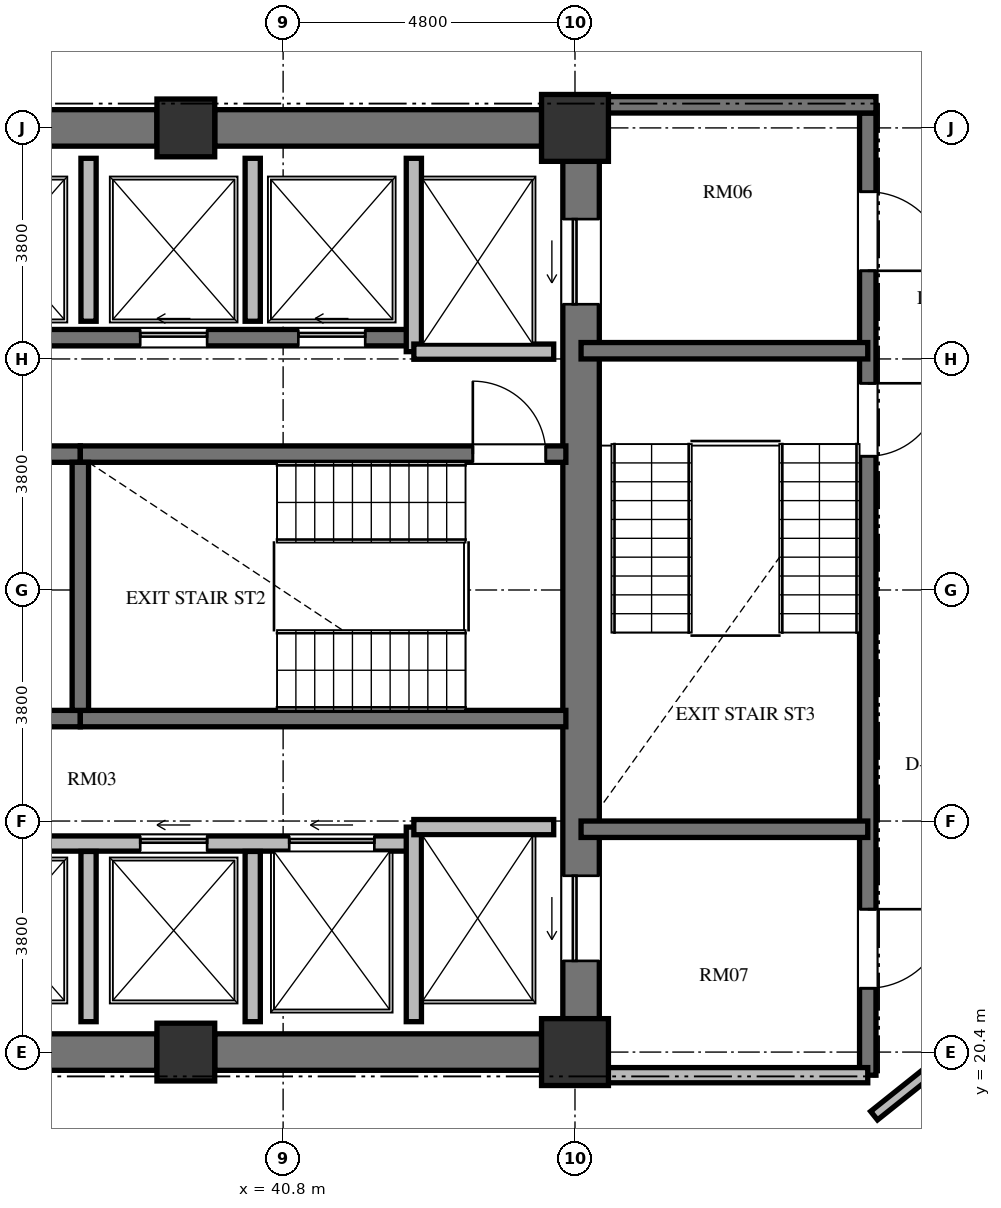
"""IFC4 building model, lengths in metres.
Left out: names, types, materials, properties, quantities, classifications, styles, units other than length and angle.
Written with IfcOpenShell. Run it as: python <this file> out.ifc"""

import sys

from ifc_helpers import new_model, si_unit, direction, frame, frame_2d, origin, origin_2d, place, context, subcontext, project, spatial, rectangle, extrude, element, fill, save


model = new_model("IFC4")
c1 = context("Model", 3, precision=1e-05, world=origin(), true_north=direction((0.0, 1.0)))
c2 = subcontext(c1, "Body", "Model", "MODEL_VIEW")
j1 = project(units=[si_unit("LENGTHUNIT", "METRE"), si_unit("PLANEANGLEUNIT", "RADIAN")], contexts=[c1])
p1 = place(None, origin())
s1 = spatial("IfcSite", under=j1, at=p1, CompositionType="ELEMENT")
p2 = place(p1, origin())
s2 = spatial("IfcBuilding", under=s1, at=p2, CompositionType="ELEMENT")
p3 = place(p2, frame((0.0, 0.0, 149.232)))
s3 = spatial("IfcBuildingStorey", under=s2, at=p3, CompositionType="ELEMENT", Elevation=149.232)
p4 = place(p3, frame((39.2, 20.4, 0.0), z_axis=(0.0, 0.0, 1.0), x_axis=(1.0, 0.0, 0.0)))
e1 = element("IfcColumn", 1, at=p4, inside=s3, PredefinedType="COLUMN", context=c2, shape_type="SweptSolid", body=[
    extrude(rectangle(XDim=0.95, YDim=0.95, at=origin_2d()), origin(), (0.0, 0.0, 1.0), 3.648),
])
for number, where, z_axis, x_axis in (
    (2, (45.6, 20.4, 0.0), (0.0, 0.0, 1.0), (1.0, 0.0, 0.0)),
    (3, (45.6, 35.6, 0.0), (0.0, 0.0, 1.0), (1.0, 0.0, 0.0)),
):
    element("IfcColumn", number, at=place(p3, frame(where, z_axis=z_axis, x_axis=x_axis)), inside=s3, PredefinedType="COLUMN", context=c2, shape_type="SweptSolid", body=[
        extrude(rectangle(XDim=1.1, YDim=1.1, at=origin_2d()), origin(), (0.0, 0.0, 1.0), 3.648),
    ])
p5 = place(p3, frame((39.2, 35.6, 0.0), z_axis=(0.0, 0.0, 1.0), x_axis=(1.0, 0.0, 0.0)))
e4 = element("IfcColumn", 4, at=p5, inside=s3, PredefinedType="COLUMN", context=c2, shape_type="SweptSolid", body=[
    extrude(rectangle(XDim=0.95, YDim=0.95, at=origin_2d()), origin(), (0.0, 0.0, 1.0), 3.648),
])
p6 = place(p3, frame((45.7, 20.95, 0.0), z_axis=(0.0, 0.0, 1.0), x_axis=(0.0, 1.0, 0.0)))
e5 = element("IfcWall", 5, at=p6, inside=s3, PredefinedType="SHEAR", context=c2, shape_type="SweptSolid", body=[
    extrude(rectangle(XDim=14.1, YDim=0.6, at=frame_2d((7.05, 0.0))), origin(), (0.0, 0.0, 1.0), 3.648),
])
p7 = place(p6, frame((11.75, 0.0, 0.0)))
e6 = element("IfcOpeningElement", 6, at=p7, cuts=e5, PredefinedType="OPENING", context=c2, shape_type="SweptSolid", body=[
    extrude(rectangle(XDim=1.4, YDim=2.3, at=frame_2d((0.7, 1.15))), frame((0.0, 0.31, 0.0), z_axis=(0.0, -1.0, 0.0), x_axis=(1.0, 0.0, 0.0)), (0.0, 0.0, 1.0), 0.62),
])
p8 = place(p6, frame((0.95, 0.0, 0.0)))
e7 = element("IfcOpeningElement", 7, at=p8, cuts=e5, PredefinedType="OPENING", context=c2, shape_type="SweptSolid", body=[
    extrude(rectangle(XDim=1.4, YDim=2.3, at=frame_2d((0.7, 1.15))), frame((0.0, 0.31, 0.0), z_axis=(0.0, -1.0, 0.0), x_axis=(1.0, 0.0, 0.0)), (0.0, 0.0, 1.0), 0.62),
])
for number, where, z_axis, x_axis in (
    (8, (33.275, 20.4, 0.0), (0.0, 0.0, 1.0), (1.0, 0.0, 0.0)),
    (9, (33.275, 35.6, 0.0), (0.0, 0.0, 1.0), (1.0, 0.0, 0.0)),
):
    element("IfcWall", number, at=place(p3, frame(where, z_axis=z_axis, x_axis=x_axis)), inside=s3, PredefinedType="SHEAR", context=c2, shape_type="SweptSolid", body=[
        extrude(rectangle(XDim=5.45, YDim=0.6, at=frame_2d((2.725, 0.0))), origin(), (0.0, 0.0, 1.0), 3.648),
    ])
for number, where, z_axis, x_axis in (
    (10, (39.675, 20.4, 0.0), (0.0, 0.0, 1.0), (1.0, 0.0, 0.0)),
    (11, (39.675, 35.6, 0.0), (0.0, 0.0, 1.0), (1.0, 0.0, 0.0)),
):
    element("IfcWall", number, at=place(p3, frame(where, z_axis=z_axis, x_axis=x_axis)), inside=s3, PredefinedType="SHEAR", context=c2, shape_type="SweptSolid", body=[
        extrude(rectangle(XDim=5.375, YDim=0.6, at=frame_2d((2.688, 0.0))), origin(), (0.0, 0.0, 1.0), 3.648),
    ])
p9 = place(p3, frame((34.535, 30.235, 0.0), z_axis=(0.0, 0.0, 1.0), x_axis=(1.0, 0.0, 0.0)))
e12 = element("IfcWall", 12, at=p9, inside=s3, PredefinedType="SHEAR", context=c2, shape_type="SweptSolid", body=[
    extrude(rectangle(XDim=2.93, YDim=0.27, at=frame_2d((1.465, 0.0))), origin(), (0.0, 0.0, 1.0), 3.648),
])
p10 = place(p9, frame((0.965, 0.0, 0.0)))
e13 = element("IfcOpeningElement", 13, at=p10, cuts=e12, PredefinedType="OPENING", context=c2, shape_type="SweptSolid", body=[
    extrude(rectangle(XDim=1.0, YDim=2.1, at=frame_2d((0.5, 1.05))), frame((0.0, 0.145, 0.0), z_axis=(0.0, -1.0, 0.0), x_axis=(1.0, 0.0, 0.0)), (0.0, 0.0, 1.0), 0.29),
])
p11 = place(p3, frame((37.465, 30.235, 0.0), z_axis=(0.0, 0.0, 1.0), x_axis=(1.0, 0.0, 0.0)))
e14 = element("IfcWall", 14, at=p11, inside=s3, PredefinedType="SHEAR", context=c2, shape_type="SweptSolid", body=[
    extrude(rectangle(XDim=7.985, YDim=0.27, at=frame_2d((3.992, 0.0))), origin(), (0.0, 0.0, 1.0), 3.648),
])
p12 = place(p11, frame((6.455, 0.0, 0.0)))
e15 = element("IfcOpeningElement", 15, at=p12, cuts=e14, PredefinedType="OPENING", context=c2, shape_type="SweptSolid", body=[
    extrude(rectangle(XDim=1.2, YDim=2.15, at=frame_2d((0.6, 1.075))), frame((0.0, 0.145, 0.0), z_axis=(0.0, -1.0, 0.0), x_axis=(1.0, 0.0, 0.0)), (0.0, 0.0, 1.0), 0.29),
])
p13 = place(p3, frame((34.535, 25.885, 0.0), z_axis=(0.0, 0.0, 1.0), x_axis=(1.0, 0.0, 0.0)))
e16 = element("IfcWall", 16, at=p13, inside=s3, PredefinedType="SHEAR", context=c2, shape_type="SweptSolid", body=[
    extrude(rectangle(XDim=2.93, YDim=0.27, at=frame_2d((1.465, 0.0))), origin(), (0.0, 0.0, 1.0), 3.648),
])
p14 = place(p3, frame((37.465, 25.885, 0.0), z_axis=(0.0, 0.0, 1.0), x_axis=(1.0, 0.0, 0.0)))
e17 = element("IfcWall", 17, at=p14, inside=s3, PredefinedType="SHEAR", context=c2, shape_type="SweptSolid", body=[
    extrude(rectangle(XDim=7.985, YDim=0.27, at=frame_2d((3.992, 0.0))), origin(), (0.0, 0.0, 1.0), 3.648),
])
p15 = place(p3, frame((37.465, 26.02, 0.0), z_axis=(0.0, 0.0, 1.0), x_axis=(0.0, 1.0, 0.0)))
e18 = element("IfcWall", 18, at=p15, inside=s3, PredefinedType="SHEAR", context=c2, shape_type="SweptSolid", body=[
    extrude(rectangle(XDim=4.08, YDim=0.27, at=frame_2d((2.04, 0.0))), origin(), (0.0, 0.0, 1.0), 3.648),
])
p16 = place(p3, frame((26.55, 32.15, 0.0), z_axis=(0.0, 0.0, 1.0), x_axis=(1.0, 0.0, 0.0)))
e19 = element("IfcWall", 19, at=p16, inside=s3, PredefinedType="SHEAR", context=c2, shape_type="SweptSolid", body=[
    extrude(rectangle(XDim=16.4, YDim=0.27, at=frame_2d((8.2, 0.0))), origin(), (0.0, 0.0, 1.0), 3.648),
])
p17 = place(p16, frame((2.425, 0.0, 0.0)))
e20 = element("IfcOpeningElement", 20, at=p17, cuts=e19, PredefinedType="OPENING", context=c2, shape_type="SweptSolid", body=[
    extrude(rectangle(XDim=1.05, YDim=2.15, at=frame_2d((0.525, 1.075))), frame((0.0, 0.145, 0.0), z_axis=(0.0, -1.0, 0.0), x_axis=(1.0, 0.0, 0.0)), (0.0, 0.0, 1.0), 0.29),
])
p18 = place(p16, frame((6.5, 0.0, 0.0)))
e21 = element("IfcOpeningElement", 21, at=p18, cuts=e19, PredefinedType="OPENING", context=c2, shape_type="SweptSolid", body=[
    extrude(rectangle(XDim=1.1, YDim=2.2, at=frame_2d((0.55, 1.1))), frame((0.0, 0.145, 0.0), z_axis=(0.0, -1.0, 0.0), x_axis=(1.0, 0.0, 0.0)), (0.0, 0.0, 1.0), 0.29),
])
p19 = place(p16, frame((9.1, 0.0, 0.0)))
e22 = element("IfcOpeningElement", 22, at=p19, cuts=e19, PredefinedType="OPENING", context=c2, shape_type="SweptSolid", body=[
    extrude(rectangle(XDim=1.1, YDim=2.2, at=frame_2d((0.55, 1.1))), frame((0.0, 0.145, 0.0), z_axis=(0.0, -1.0, 0.0), x_axis=(1.0, 0.0, 0.0)), (0.0, 0.0, 1.0), 0.29),
])
p20 = place(p16, frame((11.9, 0.0, 0.0)))
e23 = element("IfcOpeningElement", 23, at=p20, cuts=e19, PredefinedType="OPENING", context=c2, shape_type="SweptSolid", body=[
    extrude(rectangle(XDim=1.1, YDim=2.2, at=frame_2d((0.55, 1.1))), frame((0.0, 0.145, 0.0), z_axis=(0.0, -1.0, 0.0), x_axis=(1.0, 0.0, 0.0)), (0.0, 0.0, 1.0), 0.29),
])
p21 = place(p16, frame((14.5, 0.0, 0.0)))
e24 = element("IfcOpeningElement", 24, at=p21, cuts=e19, PredefinedType="OPENING", context=c2, shape_type="SweptSolid", body=[
    extrude(rectangle(XDim=1.1, YDim=2.2, at=frame_2d((0.55, 1.1))), frame((0.0, 0.145, 0.0), z_axis=(0.0, -1.0, 0.0), x_axis=(1.0, 0.0, 0.0)), (0.0, 0.0, 1.0), 0.29),
])
p22 = place(p3, frame((26.75, 23.83, 0.0), z_axis=(0.0, 0.0, 1.0), x_axis=(1.0, 0.0, 0.0)))
e25 = element("IfcWall", 25, at=p22, inside=s3, PredefinedType="SOLIDWALL", context=c2, shape_type="SweptSolid", body=[
    extrude(rectangle(XDim=16.2, YDim=0.25, at=frame_2d((8.1, 0.0))), origin(), (0.0, 0.0, 1.0), 3.428),
])
p23 = place(p22, frame((2.225, 0.0, 0.0)))
e26 = element("IfcOpeningElement", 26, at=p23, cuts=e25, PredefinedType="OPENING", context=c2, shape_type="SweptSolid", body=[
    extrude(rectangle(XDim=1.05, YDim=2.15, at=frame_2d((0.525, 1.075))), frame((0.0, 0.135, 0.0), z_axis=(0.0, -1.0, 0.0), x_axis=(1.0, 0.0, 0.0)), (0.0, 0.0, 1.0), 0.27),
])
p24 = place(p22, frame((6.3, 0.0, 0.0)))
e27 = element("IfcOpeningElement", 27, at=p24, cuts=e25, PredefinedType="OPENING", context=c2, shape_type="SweptSolid", body=[
    extrude(rectangle(XDim=1.1, YDim=2.2, at=frame_2d((0.55, 1.1))), frame((0.0, 0.135, 0.0), z_axis=(0.0, -1.0, 0.0), x_axis=(1.0, 0.0, 0.0)), (0.0, 0.0, 1.0), 0.27),
])
p25 = place(p22, frame((8.9, 0.0, 0.0)))
e28 = element("IfcOpeningElement", 28, at=p25, cuts=e25, PredefinedType="OPENING", context=c2, shape_type="SweptSolid", body=[
    extrude(rectangle(XDim=1.1, YDim=2.2, at=frame_2d((0.55, 1.1))), frame((0.0, 0.135, 0.0), z_axis=(0.0, -1.0, 0.0), x_axis=(1.0, 0.0, 0.0)), (0.0, 0.0, 1.0), 0.27),
])
p26 = place(p22, frame((11.7, 0.0, 0.0)))
e29 = element("IfcOpeningElement", 29, at=p26, cuts=e25, PredefinedType="OPENING", context=c2, shape_type="SweptSolid", body=[
    extrude(rectangle(XDim=1.1, YDim=2.2, at=frame_2d((0.55, 1.1))), frame((0.0, 0.135, 0.0), z_axis=(0.0, -1.0, 0.0), x_axis=(1.0, 0.0, 0.0)), (0.0, 0.0, 1.0), 0.27),
])
p27 = place(p22, frame((14.15, 0.0, 0.0)))
e30 = element("IfcOpeningElement", 30, at=p27, cuts=e25, PredefinedType="OPENING", context=c2, shape_type="SweptSolid", body=[
    extrude(rectangle(XDim=1.4, YDim=2.3, at=frame_2d((0.7, 1.15))), frame((0.0, 0.135, 0.0), z_axis=(0.0, -1.0, 0.0), x_axis=(1.0, 0.0, 0.0)), (0.0, 0.0, 1.0), 0.27),
])
p28 = place(p3, frame((42.95, 31.92, 0.0), z_axis=(0.0, 0.0, 1.0), x_axis=(0.0, 1.0, 0.0)))
e31 = element("IfcWall", 31, at=p28, inside=s3, PredefinedType="SOLIDWALL", context=c2, shape_type="SweptSolid", body=[
    extrude(rectangle(XDim=3.18, YDim=0.25, at=frame_2d((1.59, 0.0))), origin(), (0.0, 0.0, 1.0), 3.428),
])
p29 = place(p3, frame((42.95, 31.92, 0.0), z_axis=(0.0, 0.0, 1.0), x_axis=(1.0, 0.0, 0.0)))
e32 = element("IfcWall", 32, at=p29, inside=s3, PredefinedType="SOLIDWALL", context=c2, shape_type="SweptSolid", body=[
    extrude(rectangle(XDim=2.3, YDim=0.25, at=frame_2d((1.15, 0.0))), origin(), (0.0, 0.0, 1.0), 3.428),
])
p30 = place(p3, frame((42.95, 20.9, 0.0), z_axis=(0.0, 0.0, 1.0), x_axis=(0.0, 1.0, 0.0)))
e33 = element("IfcWall", 33, at=p30, inside=s3, PredefinedType="SOLIDWALL", context=c2, shape_type="SweptSolid", body=[
    extrude(rectangle(XDim=3.2, YDim=0.25, at=frame_2d((1.6, 0.0))), origin(), (0.0, 0.0, 1.0), 3.428),
])
p31 = place(p3, frame((42.95, 24.1, 0.0), z_axis=(0.0, 0.0, 1.0), x_axis=(1.0, 0.0, 0.0)))
e34 = element("IfcWall", 34, at=p31, inside=s3, PredefinedType="SOLIDWALL", context=c2, shape_type="SweptSolid", body=[
    extrude(rectangle(XDim=2.3, YDim=0.25, at=frame_2d((1.15, 0.0))), origin(), (0.0, 0.0, 1.0), 3.428),
])
p32 = place(p3, frame((37.6, 32.42, 0.0), z_axis=(0.0, 0.0, 1.0), x_axis=(0.0, 1.0, 0.0)))
e35 = element("IfcWall", 35, at=p32, inside=s3, PredefinedType="SOLIDWALL", context=c2, shape_type="SweptSolid", body=[
    extrude(rectangle(XDim=2.68, YDim=0.25, at=frame_2d((1.34, 0.0))), origin(), (0.0, 0.0, 1.0), 3.428),
])
p33 = place(p3, frame((37.6, 20.9, 0.0), z_axis=(0.0, 0.0, 1.0), x_axis=(0.0, 1.0, 0.0)))
e36 = element("IfcWall", 36, at=p33, inside=s3, PredefinedType="SOLIDWALL", context=c2, shape_type="SweptSolid", body=[
    extrude(rectangle(XDim=2.8, YDim=0.25, at=frame_2d((1.4, 0.0))), origin(), (0.0, 0.0, 1.0), 3.428),
])
p34 = place(p3, frame((40.3, 32.42, 0.0), z_axis=(0.0, 0.0, 1.0), x_axis=(0.0, 1.0, 0.0)))
e37 = element("IfcWall", 37, at=p34, inside=s3, PredefinedType="SOLIDWALL", context=c2, shape_type="SweptSolid", body=[
    extrude(rectangle(XDim=2.68, YDim=0.25, at=frame_2d((1.34, 0.0))), origin(), (0.0, 0.0, 1.0), 3.428),
])
p35 = place(p3, frame((40.3, 20.9, 0.0), z_axis=(0.0, 0.0, 1.0), x_axis=(0.0, 1.0, 0.0)))
e38 = element("IfcWall", 38, at=p35, inside=s3, PredefinedType="SOLIDWALL", context=c2, shape_type="SweptSolid", body=[
    extrude(rectangle(XDim=2.8, YDim=0.25, at=frame_2d((1.4, 0.0))), origin(), (0.0, 0.0, 1.0), 3.428),
])
p36 = place(p3, frame((50.415, 35.845, 0.0), z_axis=(0.0, 0.0, 1.0), x_axis=(0.0, -1.0, 0.0)))
e39 = element("IfcWall", 39, at=p36, inside=s3, PredefinedType="SHEAR", context=c2, shape_type="SweptSolid", body=[
    extrude(rectangle(XDim=15.825, YDim=0.27, at=frame_2d((7.913, 0.0))), origin(), (0.0, 0.0, 1.0), 3.648),
])
p37 = place(p36, frame((4.445, 0.0, 0.0)))
e40 = element("IfcOpeningElement", 40, at=p37, cuts=e39, PredefinedType="OPENING", context=c2, shape_type="SweptSolid", body=[
    extrude(rectangle(XDim=1.2, YDim=2.15, at=frame_2d((0.6, 1.075))), frame((0.0, 0.145, 0.0), z_axis=(0.0, -1.0, 0.0), x_axis=(1.0, 0.0, 0.0)), (0.0, 0.0, 1.0), 0.29),
])
p38 = place(p36, frame((1.295, 0.0, 0.0)))
e41 = element("IfcOpeningElement", 41, at=p38, cuts=e39, PredefinedType="OPENING", context=c2, shape_type="SweptSolid", body=[
    extrude(rectangle(XDim=1.3, YDim=2.2, at=frame_2d((0.65, 1.1))), frame((0.0, 0.145, 0.0), z_axis=(0.0, -1.0, 0.0), x_axis=(1.0, 0.0, 0.0)), (0.0, 0.0, 1.0), 0.29),
])
p39 = place(p36, frame((13.095, 0.0, 0.0)))
e42 = element("IfcOpeningElement", 42, at=p39, cuts=e39, PredefinedType="OPENING", context=c2, shape_type="SweptSolid", body=[
    extrude(rectangle(XDim=1.3, YDim=2.2, at=frame_2d((0.65, 1.1))), frame((0.0, 0.145, 0.0), z_axis=(0.0, -1.0, 0.0), x_axis=(1.0, 0.0, 0.0)), (0.0, 0.0, 1.0), 0.29),
])
p40 = place(p3, frame((46.0, 35.98, 0.0), z_axis=(0.0, 0.0, 1.0), x_axis=(1.0, 0.0, 0.0)))
e43 = element("IfcWall", 43, at=p40, inside=s3, PredefinedType="SHEAR", context=c2, shape_type="SweptSolid", body=[
    extrude(rectangle(XDim=4.55, YDim=0.27, at=frame_2d((2.275, 0.0))), origin(), (0.0, 0.0, 1.0), 3.648),
])
for number, where, z_axis, x_axis in (
    (44, (45.7, 31.935, 0.0), (0.0, 0.0, 1.0), (1.0, 0.0, 0.0)),
    (45, (45.7, 24.065, 0.0), (0.0, 0.0, 1.0), (1.0, 0.0, 0.0)),
):
    element("IfcWall", number, at=place(p3, frame(where, z_axis=z_axis, x_axis=x_axis)), inside=s3, PredefinedType="SHEAR", context=c2, shape_type="SweptSolid", body=[
        extrude(rectangle(XDim=4.715, YDim=0.27, at=frame_2d((2.357, 0.0))), origin(), (0.0, 0.0, 1.0), 3.648),
    ])
p41 = place(p3, frame((45.7, 20.02, 0.0), z_axis=(0.0, 0.0, 1.0), x_axis=(1.0, 0.0, 0.0)))
e46 = element("IfcWall", 46, at=p41, inside=s3, PredefinedType="SOLIDWALL", context=c2, shape_type="SweptSolid", body=[
    extrude(rectangle(XDim=4.715, YDim=0.25, at=frame_2d((2.357, 0.0))), origin(), (0.0, 0.0, 1.0), 3.428),
])
p42 = place(p3, frame((53.181, 21.481, 0.0), z_axis=(0.0, 0.0, 1.0), x_axis=(-0.781420737726, -0.624004511724, 0.0)))
e47 = element("IfcWall", 47, at=p42, inside=s3, PredefinedType="PARTITIONING", context=c2, shape_type="SweptSolid", body=[
    extrude(rectangle(XDim=3.407, YDim=0.18, at=frame_2d((1.704, 0.0))), origin(), (0.0, 0.0, 1.0), 3.428),
])
p43 = place(p12, origin())
e48 = element("IfcDoor", 48, at=p43, inside=s3, OperationType="SINGLE_SWING_LEFT", PredefinedType="DOOR", context=c2, shape_type="SweptSolid", body=[
    extrude(rectangle(XDim=1.2, YDim=2.15, at=frame_2d((0.6, 1.075))), frame((0.0, 0.025, 0.0), z_axis=(0.0, -1.0, 0.0), x_axis=(1.0, 0.0, 0.0)), (0.0, 0.0, 1.0), 0.05),
])
fill(e15, e48)
p44 = place(p20, origin())
e49 = element("IfcDoor", 49, at=p44, inside=s3, OperationType="SLIDING_TO_LEFT", PredefinedType="DOOR", context=c2, shape_type="SweptSolid", body=[
    extrude(rectangle(XDim=1.1, YDim=2.2, at=frame_2d((0.55, 1.1))), frame((0.0, 0.025, 0.0), z_axis=(0.0, -1.0, 0.0), x_axis=(1.0, 0.0, 0.0)), (0.0, 0.0, 1.0), 0.05),
])
fill(e23, e49)
p45 = place(p21, origin())
e50 = element("IfcDoor", 50, at=p45, inside=s3, OperationType="SLIDING_TO_LEFT", PredefinedType="DOOR", context=c2, shape_type="SweptSolid", body=[
    extrude(rectangle(XDim=1.1, YDim=2.2, at=frame_2d((0.55, 1.1))), frame((0.0, 0.025, 0.0), z_axis=(0.0, -1.0, 0.0), x_axis=(1.0, 0.0, 0.0)), (0.0, 0.0, 1.0), 0.05),
])
fill(e24, e50)
p46 = place(p26, origin())
e51 = element("IfcDoor", 51, at=p46, inside=s3, OperationType="SLIDING_TO_LEFT", PredefinedType="DOOR", context=c2, shape_type="SweptSolid", body=[
    extrude(rectangle(XDim=1.1, YDim=2.2, at=frame_2d((0.55, 1.1))), frame((0.0, 0.025, 0.0), z_axis=(0.0, -1.0, 0.0), x_axis=(1.0, 0.0, 0.0)), (0.0, 0.0, 1.0), 0.05),
])
fill(e29, e51)
p47 = place(p7, origin())
e52 = element("IfcDoor", 52, at=p47, inside=s3, OperationType="SLIDING_TO_LEFT", PredefinedType="DOOR", context=c2, shape_type="SweptSolid", body=[
    extrude(rectangle(XDim=1.4, YDim=2.3, at=frame_2d((0.7, 1.15))), frame((0.0, 0.025, 0.0), z_axis=(0.0, -1.0, 0.0), x_axis=(1.0, 0.0, 0.0)), (0.0, 0.0, 1.0), 0.05),
])
fill(e6, e52)
p48 = place(p8, origin())
e53 = element("IfcDoor", 53, at=p48, inside=s3, OperationType="SLIDING_TO_LEFT", PredefinedType="DOOR", context=c2, shape_type="SweptSolid", body=[
    extrude(rectangle(XDim=1.4, YDim=2.3, at=frame_2d((0.7, 1.15))), frame((0.0, 0.025, 0.0), z_axis=(0.0, -1.0, 0.0), x_axis=(1.0, 0.0, 0.0)), (0.0, 0.0, 1.0), 0.05),
])
fill(e7, e53)
p49 = place(p27, origin())
e54 = element("IfcDoor", 54, at=p49, inside=s3, OperationType="SLIDING_TO_LEFT", PredefinedType="DOOR", context=c2, shape_type="SweptSolid", body=[
    extrude(rectangle(XDim=1.4, YDim=2.3, at=frame_2d((0.7, 1.15))), frame((0.0, 0.025, 0.0), z_axis=(0.0, -1.0, 0.0), x_axis=(1.0, 0.0, 0.0)), (0.0, 0.0, 1.0), 0.05),
])
fill(e30, e54)
p50 = place(p37, origin())
e55 = element("IfcDoor", 55, at=p50, inside=s3, OperationType="SINGLE_SWING_LEFT", PredefinedType="DOOR", context=c2, shape_type="SweptSolid", body=[
    extrude(rectangle(XDim=1.2, YDim=2.15, at=frame_2d((0.6, 1.075))), frame((0.0, 0.025, 0.0), z_axis=(0.0, -1.0, 0.0), x_axis=(1.0, 0.0, 0.0)), (0.0, 0.0, 1.0), 0.05),
])
fill(e40, e55)
p51 = place(p38, origin())
e56 = element("IfcDoor", 56, at=p51, inside=s3, OperationType="SINGLE_SWING_RIGHT", PredefinedType="DOOR", context=c2, shape_type="SweptSolid", body=[
    extrude(rectangle(XDim=1.3, YDim=2.2, at=frame_2d((0.65, 1.1))), frame((0.0, 0.025, 0.0), z_axis=(0.0, -1.0, 0.0), x_axis=(1.0, 0.0, 0.0)), (0.0, 0.0, 1.0), 0.05),
])
fill(e41, e56)
p52 = place(p39, origin())
e57 = element("IfcDoor", 57, at=p52, inside=s3, OperationType="SINGLE_SWING_LEFT", PredefinedType="DOOR", context=c2, shape_type="SweptSolid", body=[
    extrude(rectangle(XDim=1.3, YDim=2.2, at=frame_2d((0.65, 1.1))), frame((0.0, 0.025, 0.0), z_axis=(0.0, -1.0, 0.0), x_axis=(1.0, 0.0, 0.0)), (0.0, 0.0, 1.0), 0.05),
])
fill(e42, e57)
save(model, sys.argv[1])
